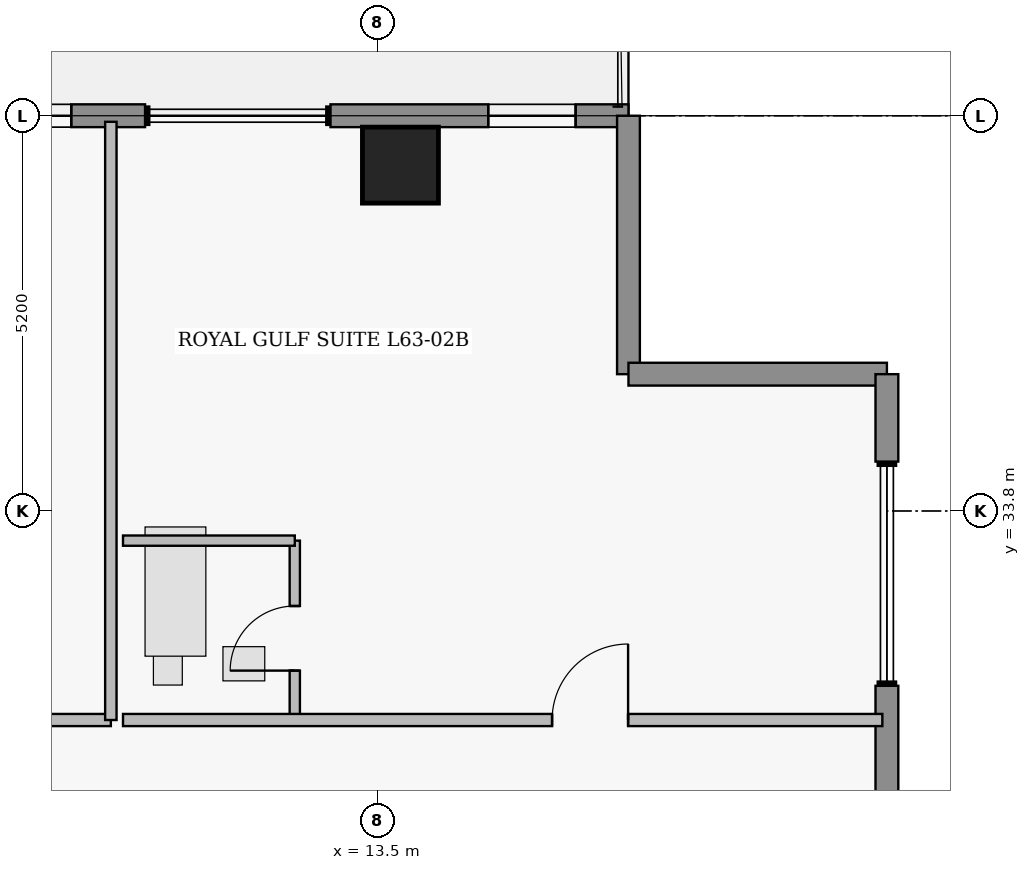
"""IFC4 building model, lengths in metres.
Left out: names, types, materials, properties, quantities, classifications, styles, units other than length and angle.
Written with IfcOpenShell. Run it as: python <this file> out.ifc"""

import sys

from ifc_helpers import new_model, si_unit, direction, frame, frame_2d, origin, origin_2d, place, context, subcontext, project, spatial, rectangle, extrude, element, fill, save


model = new_model("IFC4")
c1 = context("Model", 3, precision=1e-05, world=origin(), true_north=direction((0.0, 1.0)))
c2 = subcontext(c1, "Body", "Model", "MODEL_VIEW")
j1 = project(units=[si_unit("LENGTHUNIT", "METRE"), si_unit("PLANEANGLEUNIT", "RADIAN")], contexts=[c1])
p1 = place(None, origin())
s1 = spatial("IfcSite", under=j1, at=p1, CompositionType="ELEMENT")
p2 = place(p1, origin())
s2 = spatial("IfcBuilding", under=s1, at=p2, CompositionType="ELEMENT")
p3 = place(p2, frame((0.0, 0.0, 250.75)))
s3 = spatial("IfcBuildingStorey", under=s2, at=p3, CompositionType="ELEMENT", Elevation=250.75)
p4 = place(p3, frame((13.8, 38.35, 0.0), z_axis=(0.0, 0.0, 1.0), x_axis=(1.0, 0.0, 0.0)))
e1 = element("IfcColumn", 1, at=p4, inside=s3, PredefinedType="COLUMN", context=c2, shape_type="SweptSolid", body=[
    extrude(rectangle(XDim=1.0, YDim=1.0, at=origin_2d()), origin(), (0.0, 0.0, 1.0), 3.7),
])
p5 = place(p3, frame((3.68, 39.0, 0.0), z_axis=(0.0, 0.0, 1.0), x_axis=(1.0, 0.0, 0.0)))
e2 = element("IfcWall", 2, at=p5, inside=s3, PredefinedType="STANDARD", context=c2, shape_type="SweptSolid", body=[
    extrude(rectangle(XDim=6.76, YDim=0.3, at=frame_2d((3.38, 0.0))), origin(), (0.0, 0.0, 1.0), 3.48),
])
p6 = place(p5, frame((2.638, 0.0, 0.0)))
e3 = element("IfcOpeningElement", 3, at=p6, cuts=e2, PredefinedType="OPENING", context=c2, shape_type="SweptSolid", body=[
    extrude(rectangle(XDim=1.35, YDim=2.3, at=frame_2d((0.675, 1.15))), frame((0.0, 0.16, 0.0), z_axis=(0.0, -1.0, 0.0), x_axis=(1.0, 0.0, 0.0)), (0.0, 0.0, 1.0), 0.32),
])
p7 = place(p5, frame((4.639, 0.0, 0.95)))
e4 = element("IfcOpeningElement", 4, at=p7, cuts=e2, PredefinedType="OPENING", context=c2, shape_type="SweptSolid", body=[
    extrude(rectangle(XDim=1.15, YDim=1.55, at=frame_2d((0.575, 0.775))), frame((0.0, 0.16, 0.0), z_axis=(0.0, -1.0, 0.0), x_axis=(1.0, 0.0, 0.0)), (0.0, 0.0, 1.0), 0.32),
])
p8 = place(p3, frame((12.88, 39.0, 0.0), z_axis=(0.0, 0.0, 1.0), x_axis=(1.0, 0.0, 0.0)))
e5 = element("IfcWall", 5, at=p8, inside=s3, PredefinedType="STANDARD", context=c2, shape_type="SweptSolid", body=[
    extrude(rectangle(XDim=3.92, YDim=0.3, at=frame_2d((1.96, 0.0))), origin(), (0.0, 0.0, 1.0), 3.48),
])
p9 = place(p8, frame((2.075, 0.0, 0.95)))
e6 = element("IfcOpeningElement", 6, at=p9, cuts=e5, PredefinedType="OPENING", context=c2, shape_type="SweptSolid", body=[
    extrude(rectangle(XDim=1.15, YDim=1.55, at=frame_2d((0.575, 0.775))), frame((0.0, 0.16, 0.0), z_axis=(0.0, -1.0, 0.0), x_axis=(1.0, 0.0, 0.0)), (0.0, 0.0, 1.0), 0.32),
])
for number, where, z_axis, x_axis in (
    (7, (16.8, 39.0, 0.0), (0.0, 0.0, 1.0), (0.0, -1.0, 0.0)),
    (8, (16.8, 35.6, 0.0), (0.0, 0.0, 1.0), (1.0, 0.0, 0.0)),
):
    element("IfcWall", number, at=place(p3, frame(where, z_axis=z_axis, x_axis=x_axis)), inside=s3, PredefinedType="STANDARD", context=c2, shape_type="SweptSolid", body=[
        extrude(rectangle(XDim=3.4, YDim=0.3, at=frame_2d((1.7, 0.0))), origin(), (0.0, 0.0, 1.0), 3.48),
    ])
p10 = place(p3, frame((20.2, 35.6, 0.0), z_axis=(0.0, 0.0, 1.0), x_axis=(0.0, -1.0, 0.0)))
e9 = element("IfcWall", 9, at=p10, inside=s3, PredefinedType="STANDARD", context=c2, shape_type="SweptSolid", body=[
    extrude(rectangle(XDim=1.15, YDim=0.3, at=frame_2d((0.575, 0.0))), origin(), (0.0, 0.0, 1.0), 3.48),
])
p11 = place(p3, frame((20.2, 31.5, 0.0), z_axis=(0.0, 0.0, 1.0), x_axis=(0.0, -1.0, 0.0)))
e10 = element("IfcWall", 10, at=p11, inside=s3, PredefinedType="STANDARD", context=c2, shape_type="SweptSolid", body=[
    extrude(rectangle(XDim=2.57, YDim=0.3, at=frame_2d((1.285, 0.0))), origin(), (0.0, 0.0, 1.0), 3.48),
])
p12 = place(p3, frame((0.0, 31.05, 0.0), z_axis=(0.0, 0.0, 1.0), x_axis=(1.0, 0.0, 0.0)))
e11 = element("IfcWall", 11, at=p12, inside=s3, PredefinedType="PARTITIONING", context=c2, shape_type="SweptSolid", body=[
    extrude(rectangle(XDim=9.99, YDim=0.16, at=frame_2d((4.995, 0.0))), origin(), (0.0, 0.0, 1.0), 3.48),
])
p13 = place(p12, frame((5.645, 0.0, 0.0)))
e12 = element("IfcOpeningElement", 12, at=p13, cuts=e11, PredefinedType="OPENING", context=c2, shape_type="SweptSolid", body=[
    extrude(rectangle(XDim=1.0, YDim=2.15, at=frame_2d((0.5, 1.075))), frame((0.0, 0.09, 0.0), z_axis=(0.0, -1.0, 0.0), x_axis=(1.0, 0.0, 0.0)), (0.0, 0.0, 1.0), 0.18),
])
p14 = place(p3, frame((12.41, 31.05, 0.0), z_axis=(0.0, 0.0, 1.0), x_axis=(0.0, 1.0, 0.0)))
e13 = element("IfcWall", 13, at=p14, inside=s3, PredefinedType="PLUMBINGWALL", context=c2, shape_type="SweptSolid", body=[
    extrude(rectangle(XDim=2.36, YDim=0.135, at=frame_2d((1.18, 0.0))), origin(), (0.0, 0.0, 1.0), 3.48),
])
p15 = place(p14, frame((0.65, 0.0, 0.0)))
e14 = element("IfcOpeningElement", 14, at=p15, cuts=e13, PredefinedType="OPENING", context=c2, shape_type="SweptSolid", body=[
    extrude(rectangle(XDim=0.85, YDim=2.1, at=frame_2d((0.425, 1.05))), frame((0.0, 0.077, 0.0), z_axis=(0.0, -1.0, 0.0), x_axis=(1.0, 0.0, 0.0)), (0.0, 0.0, 1.0), 0.155),
])
p16 = place(p3, frame((10.15, 31.05, 0.0), z_axis=(0.0, 0.0, 1.0), x_axis=(1.0, 0.0, 0.0)))
e15 = element("IfcWall", 15, at=p16, inside=s3, PredefinedType="PARTITIONING", context=c2, shape_type="SweptSolid", body=[
    extrude(rectangle(XDim=9.99, YDim=0.16, at=frame_2d((4.995, 0.0))), origin(), (0.0, 0.0, 1.0), 3.48),
])
p17 = place(p16, frame((5.645, 0.0, 0.0)))
e16 = element("IfcOpeningElement", 16, at=p17, cuts=e15, PredefinedType="OPENING", context=c2, shape_type="SweptSolid", body=[
    extrude(rectangle(XDim=1.0, YDim=2.15, at=frame_2d((0.5, 1.075))), frame((0.0, 0.09, 0.0), z_axis=(0.0, -1.0, 0.0), x_axis=(1.0, 0.0, 0.0)), (0.0, 0.0, 1.0), 0.18),
])
p18 = place(p3, frame((9.99, 31.05, 0.0), z_axis=(0.0, 0.0, 1.0), x_axis=(0.0, 1.0, 0.0)))
e17 = element("IfcWall", 17, at=p18, inside=s3, PredefinedType="PARTITIONING", context=c2, shape_type="SweptSolid", body=[
    extrude(rectangle(XDim=7.87, YDim=0.15, at=frame_2d((3.935, 0.0))), origin(), (0.0, 0.0, 1.0), 3.48),
])
p19 = place(p3, frame((10.15, 33.41, 0.0), z_axis=(0.0, 0.0, 1.0), x_axis=(1.0, 0.0, 0.0)))
e18 = element("IfcWall", 18, at=p19, inside=s3, PredefinedType="PLUMBINGWALL", context=c2, shape_type="SweptSolid", body=[
    extrude(rectangle(XDim=2.26, YDim=0.135, at=frame_2d((1.13, 0.0))), origin(), (0.0, 0.0, 1.0), 3.076),
])
p20 = place(p7, origin())
e19 = element("IfcWindow", 19, at=p20, inside=s3, PartitioningType="SINGLE_PANEL", PredefinedType="WINDOW", context=c2, shape_type="SweptSolid", body=[
    extrude(rectangle(XDim=1.15, YDim=1.55, at=frame_2d((0.575, 0.775))), frame((0.0, 0.03, 0.0), z_axis=(0.0, -1.0, 0.0), x_axis=(1.0, 0.0, 0.0)), (0.0, 0.0, 1.0), 0.06),
])
fill(e4, e19)
p21 = place(p9, origin())
e20 = element("IfcWindow", 20, at=p21, inside=s3, PartitioningType="SINGLE_PANEL", PredefinedType="WINDOW", context=c2, shape_type="SweptSolid", body=[
    extrude(rectangle(XDim=1.15, YDim=1.55, at=frame_2d((0.575, 0.775))), frame((0.0, 0.03, 0.0), z_axis=(0.0, -1.0, 0.0), x_axis=(1.0, 0.0, 0.0)), (0.0, 0.0, 1.0), 0.06),
])
fill(e6, e20)
p22 = place(p15, origin())
e21 = element("IfcDoor", 21, at=p22, inside=s3, OperationType="SINGLE_SWING_LEFT", PredefinedType="DOOR", context=c2, shape_type="SweptSolid", body=[
    extrude(rectangle(XDim=0.85, YDim=2.1, at=frame_2d((0.425, 1.05))), frame((0.0, 0.025, 0.0), z_axis=(0.0, -1.0, 0.0), x_axis=(1.0, 0.0, 0.0)), (0.0, 0.0, 1.0), 0.05),
])
fill(e14, e21)
p23 = place(p17, origin())
e22 = element("IfcDoor", 22, at=p23, inside=s3, OperationType="SINGLE_SWING_RIGHT", PredefinedType="DOOR", context=c2, shape_type="SweptSolid", body=[
    extrude(rectangle(XDim=1.0, YDim=2.15, at=frame_2d((0.5, 1.075))), frame((0.0, 0.025, 0.0), z_axis=(0.0, -1.0, 0.0), x_axis=(1.0, 0.0, 0.0)), (0.0, 0.0, 1.0), 0.05),
])
fill(e16, e22)
save(model, sys.argv[1])
